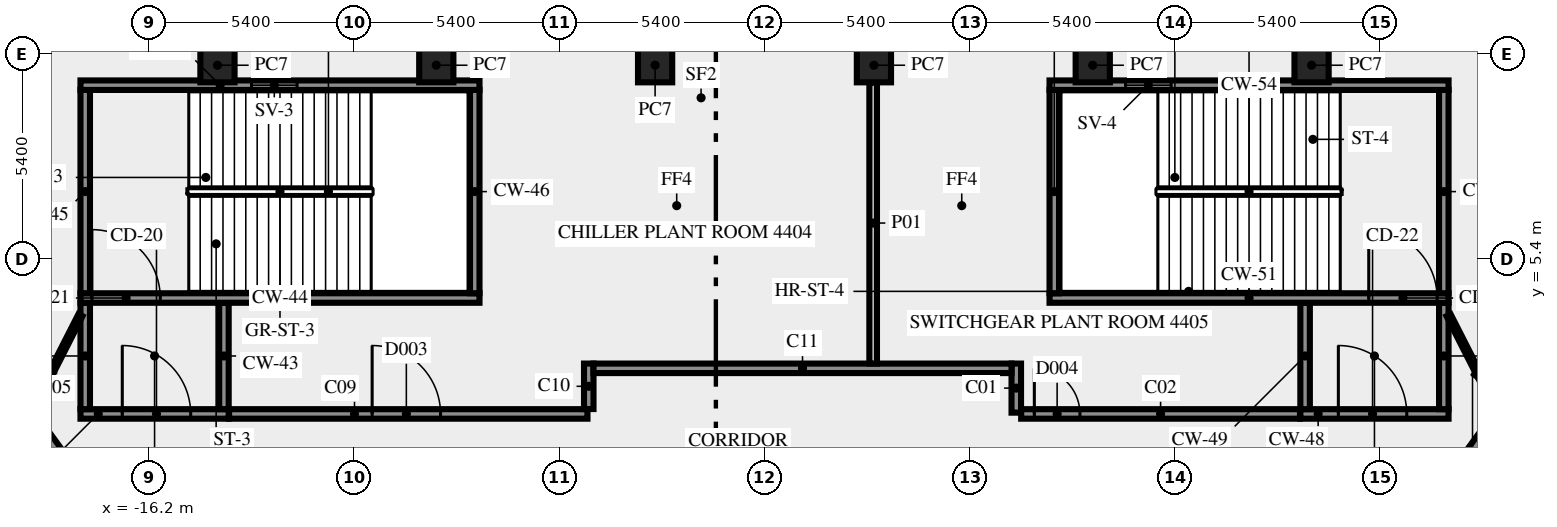
"""IFC4 building model, lengths in metres.
Left out: names, types, materials, properties, quantities, classifications, styles, units other than length and angle.
Written with IfcOpenShell. Run it as: python <this file> out.ifc"""

import sys

from ifc_helpers import new_model, si_unit, direction, frame, frame_2d, origin, origin_2d, place, context, subcontext, project, spatial, rectangle, extrude, element, fill, save


model = new_model("IFC4")
c1 = context("Model", 3, precision=1e-05, world=origin(), true_north=direction((0.0, 1.0)))
c2 = subcontext(c1, "Body", "Model", "MODEL_VIEW")
j1 = project(units=[si_unit("LENGTHUNIT", "METRE"), si_unit("PLANEANGLEUNIT", "RADIAN")], contexts=[c1])
p1 = place(None, origin())
s1 = spatial("IfcSite", under=j1, at=p1, CompositionType="ELEMENT")
p2 = place(p1, origin())
s2 = spatial("IfcBuilding", under=s1, at=p2, CompositionType="ELEMENT")
p3 = place(p2, frame((0.0, 0.0, 188.0)))
s3 = spatial("IfcBuildingStorey", under=s2, at=p3, CompositionType="ELEMENT", Elevation=188.0)
for number, where, z_axis, x_axis in (
    (1, (14.395, 10.5, 0.0), (0.0, 0.0, 1.0), (-1.0, 0.0, 0.0)),
    (2, (8.637, 10.5, 0.0), (0.0, 0.0, 1.0), (-1.0, 0.0, 0.0)),
    (3, (2.879, 10.5, 0.0), (0.0, 0.0, 1.0), (-1.0, 0.0, 0.0)),
    (4, (-2.879, 10.5, 0.0), (0.0, 0.0, 1.0), (-1.0, 0.0, 0.0)),
    (5, (-8.637, 10.5, 0.0), (0.0, 0.0, 1.0), (-1.0, 0.0, 0.0)),
    (6, (-14.395, 10.5, 0.0), (0.0, 0.0, 1.0), (-1.0, 0.0, 0.0)),
):
    element("IfcColumn", number, at=place(p3, frame(where, z_axis=z_axis, x_axis=x_axis)), inside=s3, PredefinedType="COLUMN", context=c2, shape_type="SweptSolid", body=[
        extrude(rectangle(XDim=0.9, YDim=0.9, at=origin_2d()), origin(), (0.0, 0.0, 1.0), 5.65),
    ])
p4 = place(p3, frame((-18.0, 1.325, 0.0), z_axis=(0.0, 0.0, 1.0), x_axis=(1.0, 0.0, 0.0)))
e7 = element("IfcWall", 7, at=p4, inside=s3, PredefinedType="SHEAR", context=c2, shape_type="SweptSolid", body=[
    extrude(rectangle(XDim=3.9, YDim=0.25, at=frame_2d((1.95, 0.0))), origin(), (0.0, 0.0, 1.0), 5.65),
])
p5 = place(p4, frame((1.1, 0.0, 0.0)))
e8 = element("IfcOpeningElement", 8, at=p5, cuts=e7, PredefinedType="OPENING", context=c2, shape_type="SweptSolid", body=[
    extrude(rectangle(XDim=1.8, YDim=2.1, at=frame_2d((0.9, 1.05))), frame((0.0, 0.135, 0.0), z_axis=(0.0, -1.0, 0.0), x_axis=(1.0, 0.0, 0.0)), (0.0, 0.0, 1.0), 0.27),
])
for number, where, z_axis, x_axis in (
    (9, (-17.875, 1.45, 0.0), (0.0, 0.0, 1.0), (0.0, 1.0, 0.0)),
    (10, (-14.225, 1.45, 0.0), (0.0, 0.0, 1.0), (0.0, 1.0, 0.0)),
):
    element("IfcWall", number, at=place(p3, frame(where, z_axis=z_axis, x_axis=x_axis)), inside=s3, PredefinedType="SHEAR", context=c2, shape_type="SweptSolid", body=[
        extrude(rectangle(XDim=2.8, YDim=0.25, at=frame_2d((1.4, 0.0))), origin(), (0.0, 0.0, 1.0), 5.65),
    ])
p6 = place(p3, frame((-18.0, 4.375, 0.0), z_axis=(0.0, 0.0, 1.0), x_axis=(1.0, 0.0, 0.0)))
e11 = element("IfcWall", 11, at=p6, inside=s3, PredefinedType="SHEAR", context=c2, shape_type="SweptSolid", body=[
    extrude(rectangle(XDim=10.5, YDim=0.25, at=frame_2d((5.25, 0.0))), origin(), (0.0, 0.0, 1.0), 5.65),
])
p7 = place(p6, frame((0.3, 0.0, 0.0)))
e12 = element("IfcOpeningElement", 12, at=p7, cuts=e11, PredefinedType="OPENING", context=c2, shape_type="SweptSolid", body=[
    extrude(rectangle(XDim=1.8, YDim=2.1, at=frame_2d((0.9, 1.05))), frame((0.0, 0.135, 0.0), z_axis=(0.0, -1.0, 0.0), x_axis=(1.0, 0.0, 0.0)), (0.0, 0.0, 1.0), 0.27),
])
for number, where, z_axis, x_axis in (
    (13, (-17.875, 4.5, 0.0), (0.0, 0.0, 1.0), (0.0, 1.0, 0.0)),
    (14, (-7.625, 4.5, 0.0), (0.0, 0.0, 1.0), (0.0, 1.0, 0.0)),
):
    element("IfcWall", number, at=place(p3, frame(where, z_axis=z_axis, x_axis=x_axis)), inside=s3, PredefinedType="SHEAR", context=c2, shape_type="SweptSolid", body=[
        extrude(rectangle(XDim=5.35, YDim=0.25, at=frame_2d((2.675, 0.0))), origin(), (0.0, 0.0, 1.0), 5.65),
    ])
p8 = place(p3, frame((-18.0, 9.975, 0.0), z_axis=(0.0, 0.0, 1.0), x_axis=(1.0, 0.0, 0.0)))
e15 = element("IfcWall", 15, at=p8, inside=s3, PredefinedType="SHEAR", context=c2, shape_type="SweptSolid", body=[
    extrude(rectangle(XDim=10.5, YDim=0.25, at=frame_2d((5.25, 0.0))), origin(), (0.0, 0.0, 1.0), 5.65),
])
p9 = place(p8, frame((4.5, 0.0, 1.0)))
e16 = element("IfcOpeningElement", 16, at=p9, cuts=e15, PredefinedType="OPENING", context=c2, shape_type="SweptSolid", body=[
    extrude(rectangle(XDim=1.2, YDim=1.2, at=frame_2d((0.6, 0.6))), frame((0.0, 0.135, 0.0), z_axis=(0.0, -1.0, 0.0), x_axis=(1.0, 0.0, 0.0)), (0.0, 0.0, 1.0), 0.27),
])
p10 = place(p3, frame((14.1, 1.325, 0.0), z_axis=(0.0, 0.0, 1.0), x_axis=(1.0, 0.0, 0.0)))
e17 = element("IfcWall", 17, at=p10, inside=s3, PredefinedType="SHEAR", context=c2, shape_type="SweptSolid", body=[
    extrude(rectangle(XDim=3.9, YDim=0.25, at=frame_2d((1.95, 0.0))), origin(), (0.0, 0.0, 1.0), 5.65),
])
p11 = place(p10, frame((1.0, 0.0, 0.0)))
e18 = element("IfcOpeningElement", 18, at=p11, cuts=e17, PredefinedType="OPENING", context=c2, shape_type="SweptSolid", body=[
    extrude(rectangle(XDim=1.8, YDim=2.1, at=frame_2d((0.9, 1.05))), frame((0.0, 0.135, 0.0), z_axis=(0.0, -1.0, 0.0), x_axis=(1.0, 0.0, 0.0)), (0.0, 0.0, 1.0), 0.27),
])
for number, where, z_axis, x_axis in (
    (19, (14.225, 1.45, 0.0), (0.0, 0.0, 1.0), (0.0, 1.0, 0.0)),
    (20, (17.875, 1.45, 0.0), (0.0, 0.0, 1.0), (0.0, 1.0, 0.0)),
):
    element("IfcWall", number, at=place(p3, frame(where, z_axis=z_axis, x_axis=x_axis)), inside=s3, PredefinedType="SHEAR", context=c2, shape_type="SweptSolid", body=[
        extrude(rectangle(XDim=2.8, YDim=0.25, at=frame_2d((1.4, 0.0))), origin(), (0.0, 0.0, 1.0), 5.65),
    ])
p12 = place(p3, frame((7.5, 4.375, 0.0), z_axis=(0.0, 0.0, 1.0), x_axis=(1.0, 0.0, 0.0)))
e21 = element("IfcWall", 21, at=p12, inside=s3, PredefinedType="SHEAR", context=c2, shape_type="SweptSolid", body=[
    extrude(rectangle(XDim=10.5, YDim=0.25, at=frame_2d((5.25, 0.0))), origin(), (0.0, 0.0, 1.0), 5.65),
])
p13 = place(p12, frame((8.4, 0.0, 0.0)))
e22 = element("IfcOpeningElement", 22, at=p13, cuts=e21, PredefinedType="OPENING", context=c2, shape_type="SweptSolid", body=[
    extrude(rectangle(XDim=1.8, YDim=2.1, at=frame_2d((0.9, 1.05))), frame((0.0, 0.135, 0.0), z_axis=(0.0, -1.0, 0.0), x_axis=(1.0, 0.0, 0.0)), (0.0, 0.0, 1.0), 0.27),
])
for number, where, z_axis, x_axis in (
    (23, (7.625, 4.5, 0.0), (0.0, 0.0, 1.0), (0.0, 1.0, 0.0)),
    (24, (17.875, 4.5, 0.0), (0.0, 0.0, 1.0), (0.0, 1.0, 0.0)),
):
    element("IfcWall", number, at=place(p3, frame(where, z_axis=z_axis, x_axis=x_axis)), inside=s3, PredefinedType="SHEAR", context=c2, shape_type="SweptSolid", body=[
        extrude(rectangle(XDim=5.35, YDim=0.25, at=frame_2d((2.675, 0.0))), origin(), (0.0, 0.0, 1.0), 5.65),
    ])
p14 = place(p3, frame((7.5, 9.975, 0.0), z_axis=(0.0, 0.0, 1.0), x_axis=(1.0, 0.0, 0.0)))
e25 = element("IfcWall", 25, at=p14, inside=s3, PredefinedType="SHEAR", context=c2, shape_type="SweptSolid", body=[
    extrude(rectangle(XDim=10.5, YDim=0.25, at=frame_2d((5.25, 0.0))), origin(), (0.0, 0.0, 1.0), 5.65),
])
p15 = place(p14, frame((2.0, 0.0, 1.0)))
e26 = element("IfcOpeningElement", 26, at=p15, cuts=e25, PredefinedType="OPENING", context=c2, shape_type="SweptSolid", body=[
    extrude(rectangle(XDim=1.2, YDim=1.2, at=frame_2d((0.6, 0.6))), frame((0.0, 0.135, 0.0), z_axis=(0.0, -1.0, 0.0), x_axis=(1.0, 0.0, 0.0)), (0.0, 0.0, 1.0), 0.27),
])
p16 = place(p3, frame((6.625, 2.65, 0.0), z_axis=(0.0, 0.0, 1.0), x_axis=(0.0, -1.0, 0.0)))
e27 = element("IfcWall", 27, at=p16, inside=s3, PredefinedType="SOLIDWALL", context=c2, shape_type="SweptSolid", body=[
    extrude(rectangle(XDim=1.291, YDim=0.25, at=frame_2d((0.646, 0.0))), origin(), (0.0, 0.0, 1.0), 5.65),
])
p17 = place(p3, frame((6.754, 1.325, 0.0), z_axis=(0.0, 0.0, 1.0), x_axis=(1.0, 0.0, 0.0)))
e28 = element("IfcWall", 28, at=p17, inside=s3, PredefinedType="SOLIDWALL", context=c2, shape_type="SweptSolid", body=[
    extrude(rectangle(XDim=7.336, YDim=0.25, at=frame_2d((3.668, 0.0))), origin(), (0.0, 0.0, 1.0), 5.65),
])
p18 = place(p17, frame((0.346, 0.0, 0.0)))
e29 = element("IfcOpeningElement", 29, at=p18, cuts=e28, PredefinedType="OPENING", context=c2, shape_type="SweptSolid", body=[
    extrude(rectangle(XDim=1.2, YDim=2.1, at=frame_2d((0.6, 1.05))), frame((0.0, 0.135, 0.0), z_axis=(0.0, -1.0, 0.0), x_axis=(1.0, 0.0, 0.0)), (0.0, 0.0, 1.0), 0.27),
])
p19 = place(p3, frame((17.545, -1.125, 0.0), z_axis=(0.0, 0.0, 1.0), x_axis=(0.587789755823, 0.80901372235, 0.0)))
e30 = element("IfcWall", 30, at=p19, inside=s3, PredefinedType="SOLIDWALL", context=c2, shape_type="SweptSolid", body=[
    extrude(rectangle(XDim=23.645, YDim=0.25, at=frame_2d((11.822, 0.0))), origin(), (0.0, 0.0, 1.0), 5.65),
])
p20 = place(p19, frame((3.442, 0.0, 0.0)))
e31 = element("IfcOpeningElement", 31, at=p20, cuts=e30, PredefinedType="OPENING", context=c2, shape_type="SweptSolid", body=[
    extrude(rectangle(XDim=1.2, YDim=2.1, at=frame_2d((0.6, 1.05))), frame((0.0, 0.135, 0.0), z_axis=(0.0, -1.0, 0.0), x_axis=(1.0, 0.0, 0.0)), (0.0, 0.0, 1.0), 0.27),
])
p21 = place(p3, frame((-38.44, 27.635, 0.0), z_axis=(0.0, 0.0, 1.0), x_axis=(0.587787785895, -0.809015153599, 0.0)))
e32 = element("IfcWall", 32, at=p21, inside=s3, PredefinedType="SOLIDWALL", context=c2, shape_type="SweptSolid", body=[
    extrude(rectangle(XDim=35.549, YDim=0.25, at=frame_2d((17.775, 0.0))), origin(), (0.0, 0.0, 1.0), 5.65),
])
p22 = place(p21, frame((21.025, 0.0, 0.0)))
e33 = element("IfcOpeningElement", 33, at=p22, cuts=e32, PredefinedType="OPENING", context=c2, shape_type="SweptSolid", body=[
    extrude(rectangle(XDim=1.8, YDim=2.1, at=frame_2d((0.9, 1.05))), frame((0.0, 0.135, 0.0), z_axis=(0.0, -1.0, 0.0), x_axis=(1.0, 0.0, 0.0)), (0.0, 0.0, 1.0), 0.27),
])
p23 = place(p21, frame((1.046, 0.0, 0.0)))
e34 = element("IfcOpeningElement", 34, at=p23, cuts=e32, PredefinedType="OPENING", context=c2, shape_type="SweptSolid", body=[
    extrude(rectangle(XDim=0.9, YDim=2.1, at=frame_2d((0.45, 1.05))), frame((0.0, 0.135, 0.0), z_axis=(0.0, -1.0, 0.0), x_axis=(1.0, 0.0, 0.0)), (0.0, 0.0, 1.0), 0.27),
])
p24 = place(p3, frame((-14.09, 1.325, 0.0), z_axis=(0.0, 0.0, 1.0), x_axis=(1.0, 0.0, 0.0)))
e35 = element("IfcWall", 35, at=p24, inside=s3, PredefinedType="SOLIDWALL", context=c2, shape_type="SweptSolid", body=[
    extrude(rectangle(XDim=9.431, YDim=0.25, at=frame_2d((4.716, 0.0))), origin(), (0.0, 0.0, 1.0), 5.65),
])
p25 = place(p24, frame((3.765, 0.0, 0.0)))
e36 = element("IfcOpeningElement", 36, at=p25, cuts=e35, PredefinedType="OPENING", context=c2, shape_type="SweptSolid", body=[
    extrude(rectangle(XDim=1.8, YDim=2.1, at=frame_2d((0.9, 1.05))), frame((0.0, 0.135, 0.0), z_axis=(0.0, -1.0, 0.0), x_axis=(1.0, 0.0, 0.0)), (0.0, 0.0, 1.0), 0.27),
])
p26 = place(p3, frame((-4.625, 1.454, 0.0), z_axis=(0.0, 0.0, 1.0), x_axis=(0.0, 1.0, 0.0)))
e37 = element("IfcWall", 37, at=p26, inside=s3, PredefinedType="SOLIDWALL", context=c2, shape_type="SweptSolid", body=[
    extrude(rectangle(XDim=1.196, YDim=0.25, at=frame_2d((0.598, 0.0))), origin(), (0.0, 0.0, 1.0), 5.65),
])
p27 = place(p3, frame((-4.5, 2.525, 0.0), z_axis=(0.0, 0.0, 1.0), x_axis=(1.0, 0.0, 0.0)))
e38 = element("IfcWall", 38, at=p27, inside=s3, PredefinedType="SOLIDWALL", context=c2, shape_type="SweptSolid", body=[
    extrude(rectangle(XDim=11.0, YDim=0.25, at=frame_2d((5.5, 0.0))), origin(), (0.0, 0.0, 1.0), 5.65),
])
p28 = place(p3, frame((2.859, 2.65, 0.0), z_axis=(0.0, 0.0, 1.0), x_axis=(0.0, 1.0, 0.0)))
e39 = element("IfcWall", 39, at=p28, inside=s3, PredefinedType="SOLIDWALL", context=c2, shape_type="SweptSolid", body=[
    extrude(rectangle(XDim=7.395, YDim=0.2, at=frame_2d((3.698, 0.0))), origin(), (0.0, 0.0, 1.0), 5.65),
])
for number, where, z_axis, x_axis in (
    (40, (-19.261, 1.45, 0.0), (0.0, 0.0, 1.0), (0.454, 0.891, 0.0)),
    (41, (18.0, 3.925, 0.0), (0.0, 0.0, 1.0), (0.454, -0.891, 0.0)),
):
    element("IfcWall", number, at=place(p3, frame(where, z_axis=z_axis, x_axis=x_axis)), inside=s3, PredefinedType="PARTITIONING", context=c2, shape_type="SweptSolid", body=[
        extrude(rectangle(XDim=2.778, YDim=0.12, at=frame_2d((1.389, 0.0))), origin(), (0.0, 0.0, 1.0), 5.65),
    ])
p29 = place(p5, origin())
e42 = element("IfcDoor", 42, at=p29, inside=s3, OperationType="DOUBLE_DOOR_SINGLE_SWING", PredefinedType="DOOR", context=c2, shape_type="SweptSolid", body=[
    extrude(rectangle(XDim=1.8, YDim=2.1, at=frame_2d((0.9, 1.05))), frame((0.0, 0.025, 0.0), z_axis=(0.0, -1.0, 0.0), x_axis=(1.0, 0.0, 0.0)), (0.0, 0.0, 1.0), 0.05),
])
fill(e8, e42)
p30 = place(p7, origin())
e43 = element("IfcDoor", 43, at=p30, inside=s3, OperationType="DOUBLE_DOOR_SINGLE_SWING", PredefinedType="DOOR", context=c2, shape_type="SweptSolid", body=[
    extrude(rectangle(XDim=1.8, YDim=2.1, at=frame_2d((0.9, 1.05))), frame((0.0, 0.025, 0.0), z_axis=(0.0, -1.0, 0.0), x_axis=(1.0, 0.0, 0.0)), (0.0, 0.0, 1.0), 0.05),
])
fill(e12, e43)
p31 = place(p9, origin())
e44 = element("IfcWindow", 44, at=p31, inside=s3, PartitioningType="SINGLE_PANEL", PredefinedType="WINDOW", context=c2, shape_type="SweptSolid", body=[
    extrude(rectangle(XDim=1.2, YDim=1.2, at=frame_2d((0.6, 0.6))), frame((0.0, 0.03, 0.0), z_axis=(0.0, -1.0, 0.0), x_axis=(1.0, 0.0, 0.0)), (0.0, 0.0, 1.0), 0.06),
])
fill(e16, e44)
p32 = place(p11, origin())
e45 = element("IfcDoor", 45, at=p32, inside=s3, OperationType="DOUBLE_DOOR_SINGLE_SWING", PredefinedType="DOOR", context=c2, shape_type="SweptSolid", body=[
    extrude(rectangle(XDim=1.8, YDim=2.1, at=frame_2d((0.9, 1.05))), frame((0.0, 0.025, 0.0), z_axis=(0.0, -1.0, 0.0), x_axis=(1.0, 0.0, 0.0)), (0.0, 0.0, 1.0), 0.05),
])
fill(e18, e45)
p33 = place(p13, origin())
e46 = element("IfcDoor", 46, at=p33, inside=s3, OperationType="DOUBLE_DOOR_SINGLE_SWING", PredefinedType="DOOR", context=c2, shape_type="SweptSolid", body=[
    extrude(rectangle(XDim=1.8, YDim=2.1, at=frame_2d((0.9, 1.05))), frame((0.0, 0.025, 0.0), z_axis=(0.0, -1.0, 0.0), x_axis=(1.0, 0.0, 0.0)), (0.0, 0.0, 1.0), 0.05),
])
fill(e22, e46)
p34 = place(p15, origin())
e47 = element("IfcWindow", 47, at=p34, inside=s3, PartitioningType="SINGLE_PANEL", PredefinedType="WINDOW", context=c2, shape_type="SweptSolid", body=[
    extrude(rectangle(XDim=1.2, YDim=1.2, at=frame_2d((0.6, 0.6))), frame((0.0, 0.03, 0.0), z_axis=(0.0, -1.0, 0.0), x_axis=(1.0, 0.0, 0.0)), (0.0, 0.0, 1.0), 0.06),
])
fill(e26, e47)
p35 = place(p25, origin())
e48 = element("IfcDoor", 48, at=p35, inside=s3, OperationType="DOUBLE_DOOR_SINGLE_SWING", PredefinedType="DOOR", context=c2, shape_type="SweptSolid", body=[
    extrude(rectangle(XDim=1.8, YDim=2.1, at=frame_2d((0.9, 1.05))), frame((0.0, 0.025, 0.0), z_axis=(0.0, -1.0, 0.0), x_axis=(1.0, 0.0, 0.0)), (0.0, 0.0, 1.0), 0.05),
])
fill(e36, e48)
p36 = place(p18, origin())
e49 = element("IfcDoor", 49, at=p36, inside=s3, OperationType="SINGLE_SWING_LEFT", PredefinedType="DOOR", context=c2, shape_type="SweptSolid", body=[
    extrude(rectangle(XDim=1.2, YDim=2.1, at=frame_2d((0.6, 1.05))), frame((0.0, 0.025, 0.0), z_axis=(0.0, -1.0, 0.0), x_axis=(1.0, 0.0, 0.0)), (0.0, 0.0, 1.0), 0.05),
])
fill(e29, e49)
save(model, sys.argv[1])
